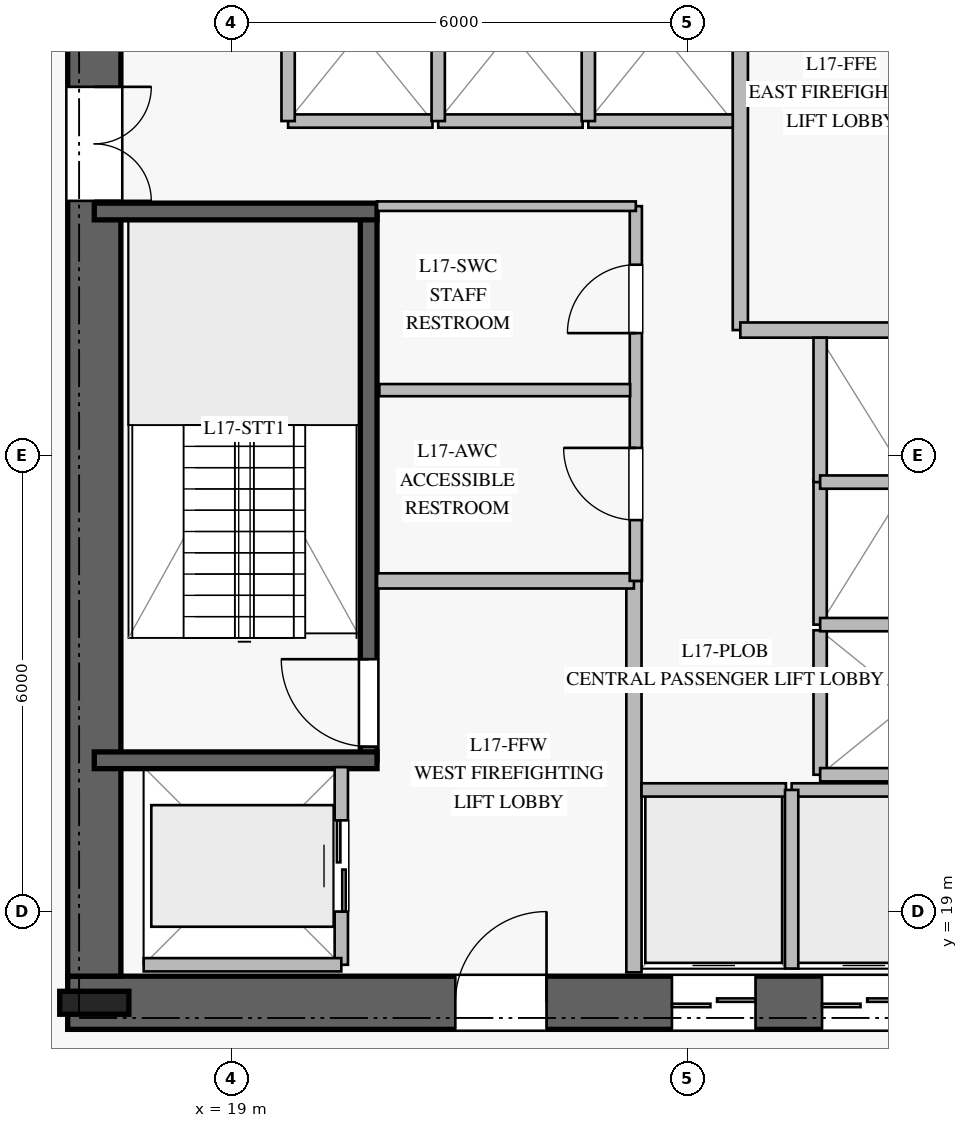
"""IFC4 building model, lengths in metres.
Left out: names, types, materials, properties, quantities, classifications, styles, units other than length and angle.
Written with IfcOpenShell. Run it as: python <this file> out.ifc"""

import sys

from ifc_helpers import new_model, si_unit, direction, frame, frame_2d, origin, origin_2d, place, context, subcontext, project, spatial, rectangle, i_section, extrude, element, fill, save


model = new_model("IFC4")
c1 = context("Model", 3, precision=1e-05, world=origin(), true_north=direction((0.0, 1.0)))
c2 = subcontext(c1, "Body", "Model", "MODEL_VIEW")
j1 = project(units=[si_unit("LENGTHUNIT", "METRE"), si_unit("PLANEANGLEUNIT", "RADIAN")], contexts=[c1])
p1 = place(None, origin())
s1 = spatial("IfcSite", under=j1, at=p1, CompositionType="ELEMENT")
p2 = place(p1, origin())
s2 = spatial("IfcBuilding", under=s1, at=p2, CompositionType="ELEMENT")
p3 = place(p2, frame((0.0, 0.0, 72.0)))
s3 = spatial("IfcBuildingStorey", under=s2, at=p3, CompositionType="ELEMENT", Elevation=72.0)
p4 = place(p3, frame((16.85, 17.8, 0.0), z_axis=(0.0, 0.0, 1.0), x_axis=(1.0, 0.0, 0.0)))
e1 = element("IfcWall", 1, at=p4, inside=s3, PredefinedType="SHEAR", context=c2, shape_type="SweptSolid", body=[
    extrude(rectangle(XDim=16.3, YDim=0.7, at=frame_2d((8.15, 0.0))), origin(), (0.0, 0.0, 1.0), 3.76),
])
p5 = place(p4, frame((5.1, 0.0, 0.0)))
e2 = element("IfcOpeningElement", 2, at=p5, cuts=e1, PredefinedType="OPENING", context=c2, shape_type="SweptSolid", body=[
    extrude(rectangle(XDim=1.2, YDim=2.25, at=frame_2d((0.6, 1.125))), frame((0.0, 0.36, 0.0), z_axis=(0.0, -1.0, 0.0), x_axis=(1.0, 0.0, 0.0)), (0.0, 0.0, 1.0), 0.72),
])
p6 = place(p4, frame((14.05, 0.0, 0.0)))
e3 = element("IfcOpeningElement", 3, at=p6, cuts=e1, PredefinedType="OPENING", context=c2, shape_type="SweptSolid", body=[
    extrude(rectangle(XDim=0.9, YDim=2.1, at=frame_2d((0.45, 1.05))), frame((0.0, 0.36, 0.0), z_axis=(0.0, -1.0, 0.0), x_axis=(1.0, 0.0, 0.0)), (0.0, 0.0, 1.0), 0.72),
])
p7 = place(p4, frame((7.95, 0.0, 0.0)))
e4 = element("IfcOpeningElement", 4, at=p7, cuts=e1, PredefinedType="OPENING", context=c2, shape_type="SweptSolid", body=[
    extrude(rectangle(XDim=1.1, YDim=2.2, at=frame_2d((0.55, 1.1))), frame((0.0, 0.36, 0.0), z_axis=(0.0, -1.0, 0.0), x_axis=(1.0, 0.0, 0.0)), (0.0, 0.0, 1.0), 0.72),
])
p8 = place(p4, frame((9.925, 0.0, 0.0)))
e5 = element("IfcOpeningElement", 5, at=p8, cuts=e1, PredefinedType="OPENING", context=c2, shape_type="SweptSolid", body=[
    extrude(rectangle(XDim=1.1, YDim=2.2, at=frame_2d((0.55, 1.1))), frame((0.0, 0.36, 0.0), z_axis=(0.0, -1.0, 0.0), x_axis=(1.0, 0.0, 0.0)), (0.0, 0.0, 1.0), 0.72),
])
p9 = place(p4, frame((11.9, 0.0, 0.0)))
e6 = element("IfcOpeningElement", 6, at=p9, cuts=e1, PredefinedType="OPENING", context=c2, shape_type="SweptSolid", body=[
    extrude(rectangle(XDim=1.1, YDim=2.2, at=frame_2d((0.55, 1.1))), frame((0.0, 0.36, 0.0), z_axis=(0.0, -1.0, 0.0), x_axis=(1.0, 0.0, 0.0)), (0.0, 0.0, 1.0), 0.72),
])
p10 = place(p3, frame((17.2, 31.85, 0.0), z_axis=(0.0, 0.0, 1.0), x_axis=(0.0, -1.0, 0.0)))
e7 = element("IfcWall", 7, at=p10, inside=s3, PredefinedType="SHEAR", context=c2, shape_type="SweptSolid", body=[
    extrude(rectangle(XDim=13.7, YDim=0.7, at=frame_2d((6.85, 0.0))), origin(), (0.0, 0.0, 1.0), 3.76),
])
p11 = place(p10, frame((2.0, 0.0, 0.0)))
e8 = element("IfcOpeningElement", 8, at=p11, cuts=e7, PredefinedType="OPENING", context=c2, shape_type="SweptSolid", body=[
    extrude(rectangle(XDim=1.5, YDim=2.2, at=frame_2d((0.75, 1.1))), frame((0.0, 0.36, 0.0), z_axis=(0.0, -1.0, 0.0), x_axis=(1.0, 0.0, 0.0)), (0.0, 0.0, 1.0), 0.72),
])
p12 = place(p3, frame((17.2, 17.8, 0.0), z_axis=(0.0, 0.0, 1.0), x_axis=(1.0, 0.0, 0.0)))
e9 = element("IfcColumn", 9, at=p12, inside=s3, PredefinedType="COLUMN", context=c2, shape_type="SweptSolid", body=[
    extrude(i_section(OverallWidth=0.302, OverallDepth=0.91, WebThickness=0.021, FlangeThickness=0.04, at=origin_2d()), origin(), (0.0, 0.0, 1.0), 4.0),
])
p13 = place(p3, frame((20.81, 20.99, 0.0), z_axis=(0.0, 0.0, 1.0), x_axis=(0.0, 1.0, 0.0)))
e10 = element("IfcWall", 10, at=p13, inside=s3, PredefinedType="SOLIDWALL", context=c2, shape_type="SweptSolid", body=[
    extrude(rectangle(XDim=7.22, YDim=0.22, at=frame_2d((3.61, 0.0))), origin(), (0.0, 0.0, 1.0), 3.76),
])
p14 = place(p13, frame((0.18, 0.0, 0.0)))
e11 = element("IfcOpeningElement", 11, at=p14, cuts=e10, PredefinedType="OPENING", context=c2, shape_type="SweptSolid", body=[
    extrude(rectangle(XDim=1.15, YDim=2.2, at=frame_2d((0.575, 1.1))), frame((0.0, 0.12, 0.0), z_axis=(0.0, -1.0, 0.0), x_axis=(1.0, 0.0, 0.0)), (0.0, 0.0, 1.0), 0.24),
])
for number, where, z_axis, x_axis in (
    (12, (17.2, 20.99, 0.0), (0.0, 0.0, 1.0), (1.0, 0.0, 0.0)),
    (13, (17.2, 28.21, 0.0), (0.0, 0.0, 1.0), (1.0, 0.0, 0.0)),
):
    element("IfcWall", number, at=place(p3, frame(where, z_axis=z_axis, x_axis=x_axis)), inside=s3, PredefinedType="SOLIDWALL", context=c2, shape_type="SweptSolid", body=[
        extrude(rectangle(XDim=3.72, YDim=0.22, at=frame_2d((1.86, 0.0))), origin(), (0.0, 0.0, 1.0), 3.76),
    ])
p15 = place(p3, frame((24.3, 18.2, 0.0), z_axis=(0.0, 0.0, 1.0), x_axis=(0.0, 1.0, 0.0)))
e14 = element("IfcWall", 14, at=p15, inside=s3, PredefinedType="PARTITIONING", context=c2, shape_type="SweptSolid", body=[
    extrude(rectangle(XDim=5.15, YDim=0.2, at=frame_2d((2.575, 0.0))), origin(), (0.0, 0.0, 1.0), 3.76),
])
p16 = place(p3, frame((20.92, 23.35, 0.0), z_axis=(0.0, 0.0, 1.0), x_axis=(1.0, 0.0, 0.0)))
e15 = element("IfcWall", 15, at=p16, inside=s3, PredefinedType="PARTITIONING", context=c2, shape_type="SweptSolid", body=[
    extrude(rectangle(XDim=3.38, YDim=0.2, at=frame_2d((1.69, 0.0))), origin(), (0.0, 0.0, 1.0), 3.76),
])
p17 = place(p3, frame((25.7, 26.65, 0.0), z_axis=(0.0, 0.0, 1.0), x_axis=(0.0, 1.0, 0.0)))
e16 = element("IfcWall", 16, at=p17, inside=s3, PredefinedType="PARTITIONING", context=c2, shape_type="SweptSolid", body=[
    extrude(rectangle(XDim=5.15, YDim=0.2, at=frame_2d((2.575, 0.0))), origin(), (0.0, 0.0, 1.0), 3.76),
])
p18 = place(p3, frame((25.7, 26.65, 0.0), z_axis=(0.0, 0.0, 1.0), x_axis=(1.0, 0.0, 0.0)))
e17 = element("IfcWall", 17, at=p18, inside=s3, PredefinedType="PARTITIONING", context=c2, shape_type="SweptSolid", body=[
    extrude(rectangle(XDim=3.38, YDim=0.2, at=frame_2d((1.69, 0.0))), origin(), (0.0, 0.0, 1.0), 3.76),
])
p19 = place(p3, frame((24.325, 23.35, 0.0), z_axis=(0.0, 0.0, 1.0), x_axis=(0.0, 1.0, 0.0)))
e18 = element("IfcWall", 18, at=p19, inside=s3, PredefinedType="PLUMBINGWALL", context=c2, shape_type="SweptSolid", body=[
    extrude(rectangle(XDim=4.93, YDim=0.16, at=frame_2d((2.465, 0.0))), origin(), (0.0, 0.0, 1.0), 3.76),
])
p20 = place(p19, frame((0.8, 0.0, 0.0)))
e19 = element("IfcOpeningElement", 19, at=p20, cuts=e18, PredefinedType="OPENING", context=c2, shape_type="SweptSolid", body=[
    extrude(rectangle(XDim=0.95, YDim=2.1, at=frame_2d((0.475, 1.05))), frame((0.0, 0.09, 0.0), z_axis=(0.0, -1.0, 0.0), x_axis=(1.0, 0.0, 0.0)), (0.0, 0.0, 1.0), 0.18),
])
p21 = place(p19, frame((3.26, 0.0, 0.0)))
e20 = element("IfcOpeningElement", 20, at=p21, cuts=e18, PredefinedType="OPENING", context=c2, shape_type="SweptSolid", body=[
    extrude(rectangle(XDim=0.9, YDim=2.1, at=frame_2d((0.45, 1.05))), frame((0.0, 0.09, 0.0), z_axis=(0.0, -1.0, 0.0), x_axis=(1.0, 0.0, 0.0)), (0.0, 0.0, 1.0), 0.18),
])
p22 = place(p3, frame((20.92, 28.28, 0.0), z_axis=(0.0, 0.0, 1.0), x_axis=(1.0, 0.0, 0.0)))
e21 = element("IfcWall", 21, at=p22, inside=s3, PredefinedType="PARTITIONING", context=c2, shape_type="SweptSolid", body=[
    extrude(rectangle(XDim=3.405, YDim=0.125, at=frame_2d((1.703, 0.0))), origin(), (0.0, 0.0, 1.0), 3.76),
])
p23 = place(p3, frame((20.95, 25.86, 0.0), z_axis=(0.0, 0.0, 1.0), x_axis=(1.0, 0.0, 0.0)))
e22 = element("IfcWall", 22, at=p23, inside=s3, PredefinedType="PLUMBINGWALL", context=c2, shape_type="SweptSolid", body=[
    extrude(rectangle(XDim=3.3, YDim=0.16, at=frame_2d((1.65, 0.0))), origin(), (0.0, 0.0, 1.0), 3.76),
])
p24 = place(p3, frame((24.4, 20.6, 0.0), z_axis=(0.0, 0.0, 1.0), x_axis=(1.0, 0.0, 0.0)))
e23 = element("IfcWall", 23, at=p24, inside=s3, PredefinedType="PARTITIONING", context=c2, shape_type="SweptSolid", body=[
    extrude(rectangle(XDim=1.9, YDim=0.175, at=frame_2d((0.95, 0.0))), origin(), (0.0, 0.0, 1.0), 3.76),
])
p25 = place(p3, frame((26.375, 20.6, 0.0), z_axis=(0.0, 0.0, 1.0), x_axis=(1.0, 0.0, 0.0)))
e24 = element("IfcWall", 24, at=p25, inside=s3, PredefinedType="PARTITIONING", context=c2, shape_type="SweptSolid", body=[
    extrude(rectangle(XDim=1.9, YDim=0.175, at=frame_2d((0.95, 0.0))), origin(), (0.0, 0.0, 1.0), 3.76),
])
p26 = place(p3, frame((26.375, 18.25, 0.0), z_axis=(0.0, 0.0, 1.0), x_axis=(0.0, 1.0, 0.0)))
e25 = element("IfcWall", 25, at=p26, inside=s3, PredefinedType="PARTITIONING", context=c2, shape_type="SweptSolid", body=[
    extrude(rectangle(XDim=2.35, YDim=0.175, at=frame_2d((1.175, 0.0))), origin(), (0.0, 0.0, 1.0), 3.76),
])
p27 = place(p3, frame((19.75, 29.4, 0.0), z_axis=(0.0, 0.0, 1.0), x_axis=(1.0, 0.0, 0.0)))
e26 = element("IfcWall", 26, at=p27, inside=s3, PredefinedType="PARTITIONING", context=c2, shape_type="SweptSolid", body=[
    extrude(rectangle(XDim=1.9, YDim=0.175, at=frame_2d((0.95, 0.0))), origin(), (0.0, 0.0, 1.0), 3.76),
])
p28 = place(p3, frame((19.75, 29.4, 0.0), z_axis=(0.0, 0.0, 1.0), x_axis=(0.0, 1.0, 0.0)))
e27 = element("IfcWall", 27, at=p28, inside=s3, PredefinedType="PARTITIONING", context=c2, shape_type="SweptSolid", body=[
    extrude(rectangle(XDim=2.35, YDim=0.175, at=frame_2d((1.175, 0.0))), origin(), (0.0, 0.0, 1.0), 3.76),
])
p29 = place(p3, frame((21.725, 29.4, 0.0), z_axis=(0.0, 0.0, 1.0), x_axis=(1.0, 0.0, 0.0)))
e28 = element("IfcWall", 28, at=p29, inside=s3, PredefinedType="PARTITIONING", context=c2, shape_type="SweptSolid", body=[
    extrude(rectangle(XDim=1.9, YDim=0.175, at=frame_2d((0.95, 0.0))), origin(), (0.0, 0.0, 1.0), 3.76),
])
p30 = place(p3, frame((21.725, 29.4, 0.0), z_axis=(0.0, 0.0, 1.0), x_axis=(0.0, 1.0, 0.0)))
e29 = element("IfcWall", 29, at=p30, inside=s3, PredefinedType="PARTITIONING", context=c2, shape_type="SweptSolid", body=[
    extrude(rectangle(XDim=2.35, YDim=0.175, at=frame_2d((1.175, 0.0))), origin(), (0.0, 0.0, 1.0), 3.76),
])
p31 = place(p3, frame((23.7, 29.4, 0.0), z_axis=(0.0, 0.0, 1.0), x_axis=(1.0, 0.0, 0.0)))
e30 = element("IfcWall", 30, at=p31, inside=s3, PredefinedType="PARTITIONING", context=c2, shape_type="SweptSolid", body=[
    extrude(rectangle(XDim=1.9, YDim=0.175, at=frame_2d((0.95, 0.0))), origin(), (0.0, 0.0, 1.0), 3.76),
])
p32 = place(p3, frame((23.7, 29.4, 0.0), z_axis=(0.0, 0.0, 1.0), x_axis=(0.0, 1.0, 0.0)))
e31 = element("IfcWall", 31, at=p32, inside=s3, PredefinedType="PARTITIONING", context=c2, shape_type="SweptSolid", body=[
    extrude(rectangle(XDim=2.35, YDim=0.175, at=frame_2d((1.175, 0.0))), origin(), (0.0, 0.0, 1.0), 3.76),
])
p33 = place(p3, frame((26.75, 20.8, 0.0), z_axis=(0.0, 0.0, 1.0), x_axis=(0.0, 1.0, 0.0)))
e32 = element("IfcWall", 32, at=p33, inside=s3, PredefinedType="PARTITIONING", context=c2, shape_type="SweptSolid", body=[
    extrude(rectangle(XDim=1.9, YDim=0.175, at=frame_2d((0.95, 0.0))), origin(), (0.0, 0.0, 1.0), 3.76),
])
p34 = place(p3, frame((26.75, 20.8, 0.0), z_axis=(0.0, 0.0, 1.0), x_axis=(1.0, 0.0, 0.0)))
e33 = element("IfcWall", 33, at=p34, inside=s3, PredefinedType="PARTITIONING", context=c2, shape_type="SweptSolid", body=[
    extrude(rectangle(XDim=2.35, YDim=0.175, at=frame_2d((1.175, 0.0))), origin(), (0.0, 0.0, 1.0), 3.76),
])
p35 = place(p3, frame((26.75, 22.775, 0.0), z_axis=(0.0, 0.0, 1.0), x_axis=(0.0, 1.0, 0.0)))
e34 = element("IfcWall", 34, at=p35, inside=s3, PredefinedType="PARTITIONING", context=c2, shape_type="SweptSolid", body=[
    extrude(rectangle(XDim=1.9, YDim=0.175, at=frame_2d((0.95, 0.0))), origin(), (0.0, 0.0, 1.0), 3.76),
])
p36 = place(p3, frame((26.75, 22.775, 0.0), z_axis=(0.0, 0.0, 1.0), x_axis=(1.0, 0.0, 0.0)))
e35 = element("IfcWall", 35, at=p36, inside=s3, PredefinedType="PARTITIONING", context=c2, shape_type="SweptSolid", body=[
    extrude(rectangle(XDim=2.35, YDim=0.175, at=frame_2d((1.175, 0.0))), origin(), (0.0, 0.0, 1.0), 3.76),
])
p37 = place(p3, frame((26.75, 24.65, 0.0), z_axis=(0.0, 0.0, 1.0), x_axis=(0.0, 1.0, 0.0)))
e36 = element("IfcWall", 36, at=p37, inside=s3, PredefinedType="PARTITIONING", context=c2, shape_type="SweptSolid", body=[
    extrude(rectangle(XDim=1.9, YDim=0.175, at=frame_2d((0.95, 0.0))), origin(), (0.0, 0.0, 1.0), 3.76),
])
p38 = place(p3, frame((26.75, 24.65, 0.0), z_axis=(0.0, 0.0, 1.0), x_axis=(1.0, 0.0, 0.0)))
e37 = element("IfcWall", 37, at=p38, inside=s3, PredefinedType="PARTITIONING", context=c2, shape_type="SweptSolid", body=[
    extrude(rectangle(XDim=2.35, YDim=0.175, at=frame_2d((1.175, 0.0))), origin(), (0.0, 0.0, 1.0), 3.76),
])
p39 = place(p3, frame((20.45, 18.3, 0.0), z_axis=(0.0, 0.0, 1.0), x_axis=(0.0, 1.0, 0.0)))
e38 = element("IfcWall", 38, at=p39, inside=s3, PredefinedType="PARTITIONING", context=c2, shape_type="SweptSolid", body=[
    extrude(rectangle(XDim=2.6, YDim=0.175, at=frame_2d((1.3, 0.0))), origin(), (0.0, 0.0, 1.0), 3.76),
])
p40 = place(p39, frame((0.7, 0.0, 0.0)))
e39 = element("IfcOpeningElement", 39, at=p40, cuts=e38, PredefinedType="OPENING", context=c2, shape_type="SweptSolid", body=[
    extrude(rectangle(XDim=1.2, YDim=2.2, at=frame_2d((0.6, 1.1))), frame((0.0, 0.098, 0.0), z_axis=(0.0, -1.0, 0.0), x_axis=(1.0, 0.0, 0.0)), (0.0, 0.0, 1.0), 0.195),
])
p41 = place(p3, frame((17.85, 18.3, 0.0), z_axis=(0.0, 0.0, 1.0), x_axis=(1.0, 0.0, 0.0)))
e40 = element("IfcWall", 40, at=p41, inside=s3, PredefinedType="PARTITIONING", context=c2, shape_type="SweptSolid", body=[
    extrude(rectangle(XDim=2.6, YDim=0.175, at=frame_2d((1.3, 0.0))), origin(), (0.0, 0.0, 1.0), 3.76),
])
p42 = place(p14, origin())
e41 = element("IfcDoor", 41, at=p42, inside=s3, OperationType="SINGLE_SWING_RIGHT", PredefinedType="DOOR", context=c2, shape_type="SweptSolid", body=[
    extrude(rectangle(XDim=1.15, YDim=2.2, at=frame_2d((0.575, 1.1))), frame((0.0, 0.025, 0.0), z_axis=(0.0, -1.0, 0.0), x_axis=(1.0, 0.0, 0.0)), (0.0, 0.0, 1.0), 0.05),
])
fill(e11, e41)
p43 = place(p5, origin())
e42 = element("IfcDoor", 42, at=p43, inside=s3, OperationType="SINGLE_SWING_RIGHT", PredefinedType="DOOR", context=c2, shape_type="SweptSolid", body=[
    extrude(rectangle(XDim=1.2, YDim=2.25, at=frame_2d((0.6, 1.125))), frame((0.0, 0.025, 0.0), z_axis=(0.0, -1.0, 0.0), x_axis=(1.0, 0.0, 0.0)), (0.0, 0.0, 1.0), 0.05),
])
fill(e2, e42)
p44 = place(p11, origin())
e43 = element("IfcDoor", 43, at=p44, inside=s3, OperationType="DOUBLE_DOOR_SINGLE_SWING", PredefinedType="DOOR", context=c2, shape_type="SweptSolid", body=[
    extrude(rectangle(XDim=1.5, YDim=2.2, at=frame_2d((0.75, 1.1))), frame((0.0, 0.025, 0.0), z_axis=(0.0, -1.0, 0.0), x_axis=(1.0, 0.0, 0.0)), (0.0, 0.0, 1.0), 0.05),
])
fill(e8, e43)
p45 = place(p20, origin())
e44 = element("IfcDoor", 44, at=p45, inside=s3, OperationType="SINGLE_SWING_RIGHT", PredefinedType="DOOR", context=c2, shape_type="SweptSolid", body=[
    extrude(rectangle(XDim=0.95, YDim=2.1, at=frame_2d((0.475, 1.05))), frame((0.0, 0.025, 0.0), z_axis=(0.0, -1.0, 0.0), x_axis=(1.0, 0.0, 0.0)), (0.0, 0.0, 1.0), 0.05),
])
fill(e19, e44)
p46 = place(p21, origin())
e45 = element("IfcDoor", 45, at=p46, inside=s3, OperationType="SINGLE_SWING_LEFT", PredefinedType="DOOR", context=c2, shape_type="SweptSolid", body=[
    extrude(rectangle(XDim=0.9, YDim=2.1, at=frame_2d((0.45, 1.05))), frame((0.0, 0.025, 0.0), z_axis=(0.0, -1.0, 0.0), x_axis=(1.0, 0.0, 0.0)), (0.0, 0.0, 1.0), 0.05),
])
fill(e20, e45)
p47 = place(p7, origin())
e46 = element("IfcDoor", 46, at=p47, inside=s3, OperationType="DOUBLE_DOOR_SLIDING", PredefinedType="DOOR", context=c2, shape_type="SweptSolid", body=[
    extrude(rectangle(XDim=1.1, YDim=2.2, at=frame_2d((0.55, 1.1))), frame((0.0, 0.025, 0.0), z_axis=(0.0, -1.0, 0.0), x_axis=(1.0, 0.0, 0.0)), (0.0, 0.0, 1.0), 0.05),
])
fill(e4, e46)
p48 = place(p8, origin())
e47 = element("IfcDoor", 47, at=p48, inside=s3, OperationType="DOUBLE_DOOR_SLIDING", PredefinedType="DOOR", context=c2, shape_type="SweptSolid", body=[
    extrude(rectangle(XDim=1.1, YDim=2.2, at=frame_2d((0.55, 1.1))), frame((0.0, 0.025, 0.0), z_axis=(0.0, -1.0, 0.0), x_axis=(1.0, 0.0, 0.0)), (0.0, 0.0, 1.0), 0.05),
])
fill(e5, e47)
p49 = place(p40, origin())
e48 = element("IfcDoor", 48, at=p49, inside=s3, OperationType="DOUBLE_DOOR_SLIDING", PredefinedType="DOOR", context=c2, shape_type="SweptSolid", body=[
    extrude(rectangle(XDim=1.2, YDim=2.2, at=frame_2d((0.6, 1.1))), frame((0.0, 0.025, 0.0), z_axis=(0.0, -1.0, 0.0), x_axis=(1.0, 0.0, 0.0)), (0.0, 0.0, 1.0), 0.05),
])
fill(e39, e48)
save(model, sys.argv[1])
